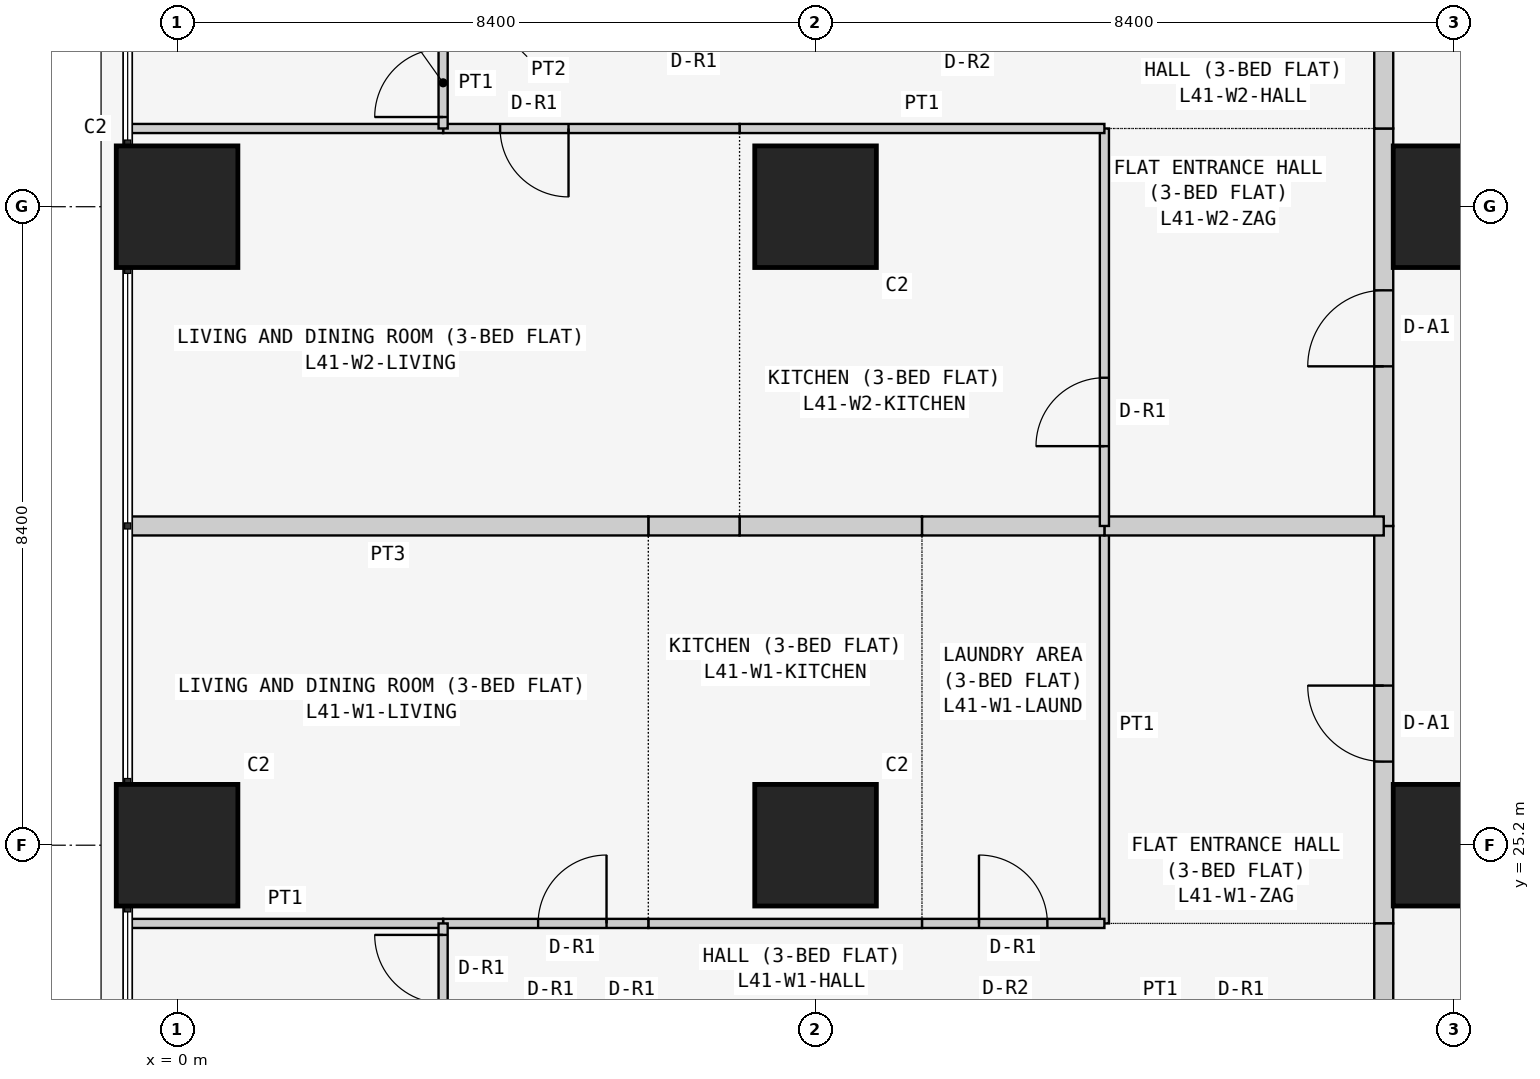
"""IFC4 building model, lengths in metres.
Left out: names, types, materials, properties, quantities, classifications, styles, units other than length and angle.
Written with IfcOpenShell. Run it as: python <this file> out.ifc"""

import sys

from ifc_helpers import new_model, si_unit, direction, frame, frame_2d, origin, origin_2d, place, context, subcontext, project, spatial, rectangle, extrude, element, fill, save


model = new_model("IFC4")
c1 = context("Model", 3, precision=1e-05, world=origin(), true_north=direction((0.0, 1.0)))
c2 = subcontext(c1, "Body", "Model", "MODEL_VIEW")
j1 = project(units=[si_unit("LENGTHUNIT", "METRE"), si_unit("PLANEANGLEUNIT", "RADIAN")], contexts=[c1])
p1 = place(None, origin())
s1 = spatial("IfcSite", under=j1, at=p1, CompositionType="ELEMENT")
p2 = place(p1, origin())
s2 = spatial("IfcBuilding", under=s1, at=p2, CompositionType="ELEMENT")
p3 = place(p2, frame((0.0, 0.0, 159.3)))
s3 = spatial("IfcBuildingStorey", under=s2, at=p3, CompositionType="ELEMENT", Elevation=159.3)
for number, where, z_axis, x_axis in (
    (1, (0.0, 25.2, 0.0), (0.0, 0.0, 1.0), (1.0, 0.0, 0.0)),
    (2, (0.0, 33.6, 0.0), (0.0, 0.0, 1.0), (1.0, 0.0, 0.0)),
    (3, (8.4, 25.2, 0.0), (0.0, 0.0, 1.0), (1.0, 0.0, 0.0)),
    (4, (8.4, 33.6, 0.0), (0.0, 0.0, 1.0), (1.0, 0.0, 0.0)),
    (5, (16.8, 25.2, 0.0), (0.0, 0.0, 1.0), (1.0, 0.0, 0.0)),
    (6, (16.8, 33.6, 0.0), (0.0, 0.0, 1.0), (1.0, 0.0, 0.0)),
):
    element("IfcColumn", number, at=place(p3, frame(where, z_axis=z_axis, x_axis=x_axis)), inside=s3, PredefinedType="COLUMN", context=c2, shape_type="SweptSolid", body=[
        extrude(rectangle(XDim=1.6, YDim=1.6, at=origin_2d()), origin(), (0.0, 0.0, 1.0), 3.6),
    ])
p4 = place(p3, frame((15.875, 24.171, 0.0), z_axis=(0.0, 0.0, 1.0), x_axis=(0.0, 1.0, 0.0)))
e7 = element("IfcWall", 7, at=p4, inside=s3, PredefinedType="PARTITIONING", context=c2, shape_type="SweptSolid", body=[
    extrude(rectangle(XDim=5.229, YDim=0.25, at=frame_2d((2.615, 0.0))), origin(), (0.0, 0.0, 1.0), 3.45),
])
p5 = place(p4, frame((2.129, 0.0, 0.0)))
e8 = element("IfcOpeningElement", 8, at=p5, cuts=e7, PredefinedType="OPENING", context=c2, shape_type="SweptSolid", body=[
    extrude(rectangle(XDim=1.0, YDim=2.1, at=frame_2d((0.5, 1.05))), frame((0.0, 0.135, 0.0), z_axis=(0.0, -1.0, 0.0), x_axis=(1.0, 0.0, 0.0)), (0.0, 0.0, 1.0), 0.27),
])
p6 = place(p3, frame((15.875, 22.971, 0.0), z_axis=(0.0, 0.0, 1.0), x_axis=(0.0, 1.0, 0.0)))
e9 = element("IfcWall", 9, at=p6, inside=s3, PredefinedType="PARTITIONING", context=c2, shape_type="SweptSolid", body=[
    extrude(rectangle(XDim=1.2, YDim=0.25, at=frame_2d((0.6, 0.0))), origin(), (0.0, 0.0, 1.0), 3.45),
])
p7 = place(p3, frame((15.875, 29.4, 0.0), z_axis=(0.0, 0.0, 1.0), x_axis=(0.0, 1.0, 0.0)))
e10 = element("IfcWall", 10, at=p7, inside=s3, PredefinedType="PARTITIONING", context=c2, shape_type="SweptSolid", body=[
    extrude(rectangle(XDim=5.229, YDim=0.25, at=frame_2d((2.615, 0.0))), origin(), (0.0, 0.0, 1.0), 3.45),
])
p8 = place(p7, frame((2.1, 0.0, 0.0)))
e11 = element("IfcOpeningElement", 11, at=p8, cuts=e10, PredefinedType="OPENING", context=c2, shape_type="SweptSolid", body=[
    extrude(rectangle(XDim=1.0, YDim=2.1, at=frame_2d((0.5, 1.05))), frame((0.0, 0.135, 0.0), z_axis=(0.0, -1.0, 0.0), x_axis=(1.0, 0.0, 0.0)), (0.0, 0.0, 1.0), 0.27),
])
p9 = place(p3, frame((15.875, 34.629, 0.0), z_axis=(0.0, 0.0, 1.0), x_axis=(0.0, 1.0, 0.0)))
e12 = element("IfcWall", 12, at=p9, inside=s3, PredefinedType="PARTITIONING", context=c2, shape_type="SweptSolid", body=[
    extrude(rectangle(XDim=1.2, YDim=0.25, at=frame_2d((0.6, 0.0))), origin(), (0.0, 0.0, 1.0), 3.45),
])
p10 = place(p3, frame((12.2, 29.4, 0.0), z_axis=(0.0, 0.0, 1.0), x_axis=(0.0, -1.0, 0.0)))
e13 = element("IfcWall", 13, at=p10, inside=s3, PredefinedType="PARTITIONING", context=c2, shape_type="SweptSolid", body=[
    extrude(rectangle(XDim=5.229, YDim=0.12, at=frame_2d((2.615, 0.0))), origin(), (0.0, 0.0, 1.0), 3.45),
])
p11 = place(p3, frame((15.875, 29.4, 0.0), z_axis=(0.0, 0.0, 1.0), x_axis=(-1.0, 0.0, 0.0)))
e14 = element("IfcWall", 14, at=p11, inside=s3, PredefinedType="PARTITIONING", context=c2, shape_type="SweptSolid", body=[
    extrude(rectangle(XDim=3.675, YDim=0.25, at=frame_2d((1.837, 0.0))), origin(), (0.0, 0.0, 1.0), 3.45),
])
p12 = place(p3, frame((9.8, 24.171, 0.0), z_axis=(0.0, 0.0, 1.0), x_axis=(1.0, 0.0, 0.0)))
e15 = element("IfcWall", 15, at=p12, inside=s3, PredefinedType="PARTITIONING", context=c2, shape_type="SweptSolid", body=[
    extrude(rectangle(XDim=2.4, YDim=0.12, at=frame_2d((1.2, 0.0))), origin(), (0.0, 0.0, 1.0), 3.45),
])
p13 = place(p12, frame((0.75, 0.0, 0.0)))
e16 = element("IfcOpeningElement", 16, at=p13, cuts=e15, PredefinedType="OPENING", context=c2, shape_type="SweptSolid", body=[
    extrude(rectangle(XDim=0.9, YDim=2.1, at=frame_2d((0.45, 1.05))), frame((0.0, 0.07, 0.0), z_axis=(0.0, -1.0, 0.0), x_axis=(1.0, 0.0, 0.0)), (0.0, 0.0, 1.0), 0.14),
])
p14 = place(p3, frame((12.2, 29.4, 0.0), z_axis=(0.0, 0.0, 1.0), x_axis=(-1.0, 0.0, 0.0)))
e17 = element("IfcWall", 17, at=p14, inside=s3, PredefinedType="PARTITIONING", context=c2, shape_type="SweptSolid", body=[
    extrude(rectangle(XDim=2.4, YDim=0.25, at=frame_2d((1.2, 0.0))), origin(), (0.0, 0.0, 1.0), 3.45),
])
p15 = place(p3, frame((6.2, 24.171, 0.0), z_axis=(0.0, 0.0, 1.0), x_axis=(1.0, 0.0, 0.0)))
e18 = element("IfcWall", 18, at=p15, inside=s3, PredefinedType="PARTITIONING", context=c2, shape_type="SweptSolid", body=[
    extrude(rectangle(XDim=3.6, YDim=0.12, at=frame_2d((1.8, 0.0))), origin(), (0.0, 0.0, 1.0), 3.45),
])
p16 = place(p3, frame((9.8, 29.4, 0.0), z_axis=(0.0, 0.0, 1.0), x_axis=(-1.0, 0.0, 0.0)))
e19 = element("IfcWall", 19, at=p16, inside=s3, PredefinedType="PARTITIONING", context=c2, shape_type="SweptSolid", body=[
    extrude(rectangle(XDim=2.4, YDim=0.25, at=frame_2d((1.2, 0.0))), origin(), (0.0, 0.0, 1.0), 3.45),
])
p17 = place(p3, frame((7.4, 29.4, 0.0), z_axis=(0.0, 0.0, 1.0), x_axis=(-1.0, 0.0, 0.0)))
e20 = element("IfcWall", 20, at=p17, inside=s3, PredefinedType="PARTITIONING", context=c2, shape_type="SweptSolid", body=[
    extrude(rectangle(XDim=1.2, YDim=0.25, at=frame_2d((0.6, 0.0))), origin(), (0.0, 0.0, 1.0), 3.45),
])
p18 = place(p3, frame((3.5, 24.171, 0.0), z_axis=(0.0, 0.0, 1.0), x_axis=(1.0, 0.0, 0.0)))
e21 = element("IfcWall", 21, at=p18, inside=s3, PredefinedType="PARTITIONING", context=c2, shape_type="SweptSolid", body=[
    extrude(rectangle(XDim=2.7, YDim=0.12, at=frame_2d((1.35, 0.0))), origin(), (0.0, 0.0, 1.0), 3.45),
])
p19 = place(p18, frame((1.25, 0.0, 0.0)))
e22 = element("IfcOpeningElement", 22, at=p19, cuts=e21, PredefinedType="OPENING", context=c2, shape_type="SweptSolid", body=[
    extrude(rectangle(XDim=0.9, YDim=2.1, at=frame_2d((0.45, 1.05))), frame((0.0, 0.07, 0.0), z_axis=(0.0, -1.0, 0.0), x_axis=(1.0, 0.0, 0.0)), (0.0, 0.0, 1.0), 0.14),
])
p20 = place(p3, frame((-0.65, 24.171, 0.0), z_axis=(0.0, 0.0, 1.0), x_axis=(1.0, 0.0, 0.0)))
e23 = element("IfcWall", 23, at=p20, inside=s3, PredefinedType="PARTITIONING", context=c2, shape_type="SweptSolid", body=[
    extrude(rectangle(XDim=4.15, YDim=0.12, at=frame_2d((2.075, 0.0))), origin(), (0.0, 0.0, 1.0), 3.45),
])
p21 = place(p3, frame((6.2, 29.4, 0.0), z_axis=(0.0, 0.0, 1.0), x_axis=(-1.0, 0.0, 0.0)))
e24 = element("IfcWall", 24, at=p21, inside=s3, PredefinedType="PARTITIONING", context=c2, shape_type="SweptSolid", body=[
    extrude(rectangle(XDim=6.85, YDim=0.25, at=frame_2d((3.425, 0.0))), origin(), (0.0, 0.0, 1.0), 3.45),
])
p22 = place(p3, frame((3.5, 24.171, 0.0), z_axis=(0.0, 0.0, 1.0), x_axis=(0.0, -1.0, 0.0)))
e25 = element("IfcWall", 25, at=p22, inside=s3, PredefinedType="PARTITIONING", context=c2, shape_type="SweptSolid", body=[
    extrude(rectangle(XDim=1.2, YDim=0.12, at=frame_2d((0.6, 0.0))), origin(), (0.0, 0.0, 1.0), 3.45),
])
p23 = place(p22, frame((0.151, 0.0, 0.0)))
e26 = element("IfcOpeningElement", 26, at=p23, cuts=e25, PredefinedType="OPENING", context=c2, shape_type="SweptSolid", body=[
    extrude(rectangle(XDim=0.9, YDim=2.1, at=frame_2d((0.45, 1.05))), frame((0.0, 0.07, 0.0), z_axis=(0.0, -1.0, 0.0), x_axis=(1.0, 0.0, 0.0)), (0.0, 0.0, 1.0), 0.14),
])
p24 = place(p3, frame((12.2, 29.4, 0.0), z_axis=(0.0, 0.0, 1.0), x_axis=(0.0, 1.0, 0.0)))
e27 = element("IfcWall", 27, at=p24, inside=s3, PredefinedType="PARTITIONING", context=c2, shape_type="SweptSolid", body=[
    extrude(rectangle(XDim=5.229, YDim=0.12, at=frame_2d((2.615, 0.0))), origin(), (0.0, 0.0, 1.0), 3.45),
])
p25 = place(p24, frame((1.05, 0.0, 0.0)))
e28 = element("IfcOpeningElement", 28, at=p25, cuts=e27, PredefinedType="OPENING", context=c2, shape_type="SweptSolid", body=[
    extrude(rectangle(XDim=0.9, YDim=2.1, at=frame_2d((0.45, 1.05))), frame((0.0, 0.07, 0.0), z_axis=(0.0, -1.0, 0.0), x_axis=(1.0, 0.0, 0.0)), (0.0, 0.0, 1.0), 0.14),
])
p26 = place(p3, frame((7.4, 34.629, 0.0), z_axis=(0.0, 0.0, 1.0), x_axis=(1.0, 0.0, 0.0)))
e29 = element("IfcWall", 29, at=p26, inside=s3, PredefinedType="PARTITIONING", context=c2, shape_type="SweptSolid", body=[
    extrude(rectangle(XDim=4.8, YDim=0.12, at=frame_2d((2.4, 0.0))), origin(), (0.0, 0.0, 1.0), 3.45),
])
p27 = place(p3, frame((3.5, 34.629, 0.0), z_axis=(0.0, 0.0, 1.0), x_axis=(1.0, 0.0, 0.0)))
e30 = element("IfcWall", 30, at=p27, inside=s3, PredefinedType="PARTITIONING", context=c2, shape_type="SweptSolid", body=[
    extrude(rectangle(XDim=3.9, YDim=0.12, at=frame_2d((1.95, 0.0))), origin(), (0.0, 0.0, 1.0), 3.45),
])
p28 = place(p27, frame((0.75, 0.0, 0.0)))
e31 = element("IfcOpeningElement", 31, at=p28, cuts=e30, PredefinedType="OPENING", context=c2, shape_type="SweptSolid", body=[
    extrude(rectangle(XDim=0.9, YDim=2.1, at=frame_2d((0.45, 1.05))), frame((0.0, 0.07, 0.0), z_axis=(0.0, -1.0, 0.0), x_axis=(1.0, 0.0, 0.0)), (0.0, 0.0, 1.0), 0.14),
])
p29 = place(p3, frame((-0.65, 34.629, 0.0), z_axis=(0.0, 0.0, 1.0), x_axis=(1.0, 0.0, 0.0)))
e32 = element("IfcWall", 32, at=p29, inside=s3, PredefinedType="PARTITIONING", context=c2, shape_type="SweptSolid", body=[
    extrude(rectangle(XDim=4.15, YDim=0.12, at=frame_2d((2.075, 0.0))), origin(), (0.0, 0.0, 1.0), 3.45),
])
p30 = place(p3, frame((3.5, 34.629, 0.0), z_axis=(0.0, 0.0, 1.0), x_axis=(0.0, 1.0, 0.0)))
e33 = element("IfcWall", 33, at=p30, inside=s3, PredefinedType="PARTITIONING", context=c2, shape_type="SweptSolid", body=[
    extrude(rectangle(XDim=1.2, YDim=0.12, at=frame_2d((0.6, 0.0))), origin(), (0.0, 0.0, 1.0), 3.45),
])
p31 = place(p30, frame((0.151, 0.0, 0.0)))
e34 = element("IfcOpeningElement", 34, at=p31, cuts=e33, PredefinedType="OPENING", context=c2, shape_type="SweptSolid", body=[
    extrude(rectangle(XDim=0.9, YDim=2.1, at=frame_2d((0.45, 1.05))), frame((0.0, 0.07, 0.0), z_axis=(0.0, -1.0, 0.0), x_axis=(1.0, 0.0, 0.0)), (0.0, 0.0, 1.0), 0.14),
])
p32 = place(p5, origin())
e35 = element("IfcDoor", 35, at=p32, inside=s3, OperationType="SINGLE_SWING_RIGHT", PredefinedType="DOOR", context=c2, shape_type="SweptSolid", body=[
    extrude(rectangle(XDim=1.0, YDim=2.1, at=frame_2d((0.5, 1.05))), frame((0.0, 0.025, 0.0), z_axis=(0.0, -1.0, 0.0), x_axis=(1.0, 0.0, 0.0)), (0.0, 0.0, 1.0), 0.05),
])
fill(e8, e35)
p33 = place(p13, origin())
e36 = element("IfcDoor", 36, at=p33, inside=s3, OperationType="SINGLE_SWING_LEFT", PredefinedType="DOOR", context=c2, shape_type="SweptSolid", body=[
    extrude(rectangle(XDim=0.9, YDim=2.1, at=frame_2d((0.45, 1.05))), frame((0.0, 0.025, 0.0), z_axis=(0.0, -1.0, 0.0), x_axis=(1.0, 0.0, 0.0)), (0.0, 0.0, 1.0), 0.05),
])
fill(e16, e36)
p34 = place(p19, origin())
e37 = element("IfcDoor", 37, at=p34, inside=s3, OperationType="SINGLE_SWING_RIGHT", PredefinedType="DOOR", context=c2, shape_type="SweptSolid", body=[
    extrude(rectangle(XDim=0.9, YDim=2.1, at=frame_2d((0.45, 1.05))), frame((0.0, 0.025, 0.0), z_axis=(0.0, -1.0, 0.0), x_axis=(1.0, 0.0, 0.0)), (0.0, 0.0, 1.0), 0.05),
])
fill(e22, e37)
p35 = place(p23, frame((0.9, 0.0, 0.0), z_axis=(0.0, 0.0, 1.0), x_axis=(-1.0, 0.0, 0.0)))
e38 = element("IfcDoor", 38, at=p35, inside=s3, OperationType="SINGLE_SWING_RIGHT", PredefinedType="DOOR", context=c2, shape_type="SweptSolid", body=[
    extrude(rectangle(XDim=0.9, YDim=2.1, at=frame_2d((0.45, 1.05))), frame((0.0, 0.025, 0.0), z_axis=(0.0, -1.0, 0.0), x_axis=(1.0, 0.0, 0.0)), (0.0, 0.0, 1.0), 0.05),
])
fill(e26, e38)
p36 = place(p8, origin())
e39 = element("IfcDoor", 39, at=p36, inside=s3, OperationType="SINGLE_SWING_LEFT", PredefinedType="DOOR", context=c2, shape_type="SweptSolid", body=[
    extrude(rectangle(XDim=1.0, YDim=2.1, at=frame_2d((0.5, 1.05))), frame((0.0, 0.025, 0.0), z_axis=(0.0, -1.0, 0.0), x_axis=(1.0, 0.0, 0.0)), (0.0, 0.0, 1.0), 0.05),
])
fill(e11, e39)
p37 = place(p25, origin())
e40 = element("IfcDoor", 40, at=p37, inside=s3, OperationType="SINGLE_SWING_LEFT", PredefinedType="DOOR", context=c2, shape_type="SweptSolid", body=[
    extrude(rectangle(XDim=0.9, YDim=2.1, at=frame_2d((0.45, 1.05))), frame((0.0, 0.025, 0.0), z_axis=(0.0, -1.0, 0.0), x_axis=(1.0, 0.0, 0.0)), (0.0, 0.0, 1.0), 0.05),
])
fill(e28, e40)
p38 = place(p28, frame((0.9, 0.0, 0.0), z_axis=(0.0, 0.0, 1.0), x_axis=(-1.0, 0.0, 0.0)))
e41 = element("IfcDoor", 41, at=p38, inside=s3, OperationType="SINGLE_SWING_LEFT", PredefinedType="DOOR", context=c2, shape_type="SweptSolid", body=[
    extrude(rectangle(XDim=0.9, YDim=2.1, at=frame_2d((0.45, 1.05))), frame((0.0, 0.025, 0.0), z_axis=(0.0, -1.0, 0.0), x_axis=(1.0, 0.0, 0.0)), (0.0, 0.0, 1.0), 0.05),
])
fill(e31, e41)
p39 = place(p31, origin())
e42 = element("IfcDoor", 42, at=p39, inside=s3, OperationType="SINGLE_SWING_LEFT", PredefinedType="DOOR", context=c2, shape_type="SweptSolid", body=[
    extrude(rectangle(XDim=0.9, YDim=2.1, at=frame_2d((0.45, 1.05))), frame((0.0, 0.025, 0.0), z_axis=(0.0, -1.0, 0.0), x_axis=(1.0, 0.0, 0.0)), (0.0, 0.0, 1.0), 0.05),
])
fill(e34, e42)
save(model, sys.argv[1])
